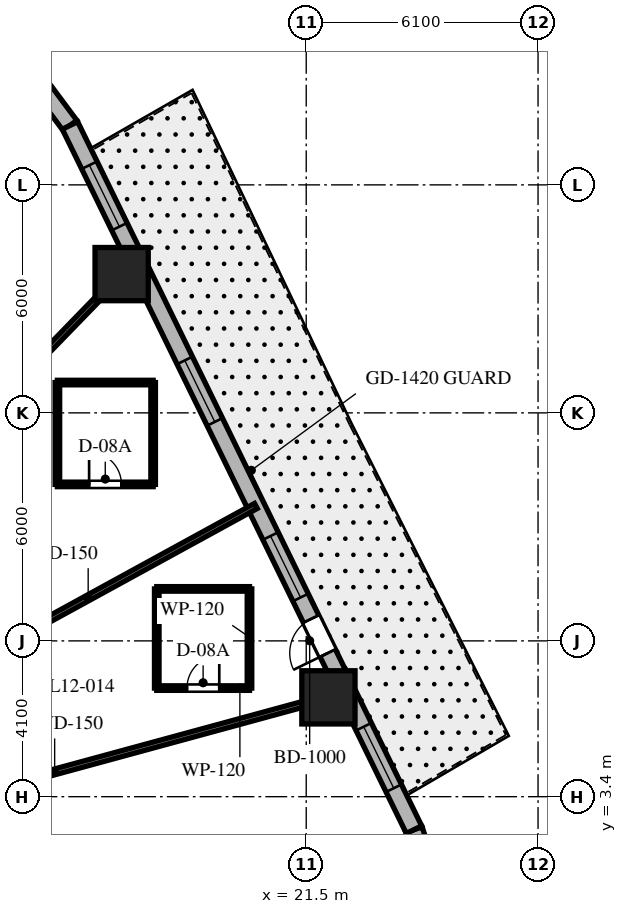
"""IFC4 building model, lengths in metres.
Left out: names, types, materials, properties, quantities, classifications, styles, units other than length and angle.
Written with IfcOpenShell. Run it as: python <this file> out.ifc"""

import sys

from ifc_helpers import new_model, si_unit, direction, frame, frame_2d, origin, origin_2d, place, context, subcontext, project, spatial, rectangle, extrude, element, fill, save


model = new_model("IFC4")
c1 = context("Model", 3, precision=1e-05, world=origin(), true_north=direction((0.0, 1.0)))
c2 = subcontext(c1, "Body", "Model", "MODEL_VIEW")
j1 = project(units=[si_unit("LENGTHUNIT", "METRE"), si_unit("PLANEANGLEUNIT", "RADIAN")], contexts=[c1])
p1 = place(None, origin())
s1 = spatial("IfcSite", under=j1, at=p1, CompositionType="ELEMENT")
p2 = place(p1, origin())
s2 = spatial("IfcBuilding", under=s1, at=p2, CompositionType="ELEMENT")
p3 = place(p2, frame((0.0, 0.0, 56.4)))
s3 = spatial("IfcBuildingStorey", under=s2, at=p3, CompositionType="ELEMENT", Elevation=56.4)
for number, where, z_axis, x_axis in (
    (1, (22.084, 6.014, 0.0), (0.0, 0.0, 1.0), (1.0, 0.0, 0.0)),
    (2, (16.643, 17.152, 0.0), (0.0, 0.0, 1.0), (1.0, 0.0, 0.0)),
):
    element("IfcColumn", number, at=place(p3, frame(where, z_axis=z_axis, x_axis=x_axis)), inside=s3, PredefinedType="COLUMN", context=c2, shape_type="SweptSolid", body=[
        extrude(rectangle(XDim=1.4, YDim=1.4, at=origin_2d()), origin(), (0.0, 0.0, 1.0), 3.7),
    ])
p4 = place(p3, frame((24.621, 1.682, 0.0), z_axis=(0.0, 0.0, 1.0), x_axis=(-0.317697451681, 0.948192137278, 0.0)))
e3 = element("IfcWall", 3, at=p4, inside=s3, PredefinedType="SOLIDWALL", context=c2, shape_type="SweptSolid", body=[
    extrude(rectangle(XDim=0.897, YDim=0.45, at=frame_2d((0.448, 0.0))), origin(), (0.0, 0.0, 1.0), 3.4),
])
p5 = place(p3, frame((15.284, 21.062, 0.0), z_axis=(0.0, 0.0, 1.0), x_axis=(-0.597595366449, 0.801797841104, 0.0)))
e4 = element("IfcWall", 4, at=p5, inside=s3, PredefinedType="SOLIDWALL", context=c2, shape_type="SweptSolid", body=[
    extrude(rectangle(XDim=1.269, YDim=0.45, at=frame_2d((0.634, 0.0))), origin(), (0.0, 0.0, 1.0), 3.4),
])
p6 = place(p3, frame((24.336, 2.532, 0.0), z_axis=(0.0, 0.0, 1.0), x_axis=(-0.438931326393, 0.898520612291, 0.0)))
e5 = element("IfcWall", 5, at=p6, inside=s3, PredefinedType="SOLIDWALL", context=c2, shape_type="SweptSolid", body=[
    extrude(rectangle(XDim=20.623, YDim=0.45, at=frame_2d((10.312, 0.0))), origin(), (0.0, 0.0, 1.0), 3.4),
])
p7 = place(p6, frame((5.171, 0.0, 0.0)))
e6 = element("IfcOpeningElement", 6, at=p7, cuts=e5, PredefinedType="OPENING", context=c2, shape_type="SweptSolid", body=[
    extrude(rectangle(XDim=1.0, YDim=2.15, at=frame_2d((0.5, 1.075))), frame((0.0, 0.235, 0.0), z_axis=(0.0, -1.0, 0.0), x_axis=(1.0, 0.0, 0.0)), (0.0, 0.0, 1.0), 0.47),
])
p8 = place(p6, frame((6.8, 0.0, 0.8)))
e7 = element("IfcOpeningElement", 7, at=p8, cuts=e5, PredefinedType="OPENING", context=c2, shape_type="SweptSolid", body=[
    extrude(rectangle(XDim=1.8, YDim=1.8, at=frame_2d((0.9, 0.9))), frame((0.0, 0.235, 0.0), z_axis=(0.0, -1.0, 0.0), x_axis=(1.0, 0.0, 0.0)), (0.0, 0.0, 1.0), 0.47),
])
p9 = place(p6, frame((11.942, 0.0, 0.8)))
e8 = element("IfcOpeningElement", 8, at=p9, cuts=e5, PredefinedType="OPENING", context=c2, shape_type="SweptSolid", body=[
    extrude(rectangle(XDim=1.8, YDim=1.8, at=frame_2d((0.9, 0.9))), frame((0.0, 0.235, 0.0), z_axis=(0.0, -1.0, 0.0), x_axis=(1.0, 0.0, 0.0)), (0.0, 0.0, 1.0), 0.47),
])
p10 = place(p6, frame((17.66, 0.0, 0.8)))
e9 = element("IfcOpeningElement", 9, at=p10, cuts=e5, PredefinedType="OPENING", context=c2, shape_type="SweptSolid", body=[
    extrude(rectangle(XDim=1.8, YDim=1.8, at=frame_2d((0.9, 0.9))), frame((0.0, 0.235, 0.0), z_axis=(0.0, -1.0, 0.0), x_axis=(1.0, 0.0, 0.0)), (0.0, 0.0, 1.0), 0.47),
])
p11 = place(p6, frame((1.214, 0.0, 0.8)))
e10 = element("IfcOpeningElement", 10, at=p11, cuts=e5, PredefinedType="OPENING", context=c2, shape_type="SweptSolid", body=[
    extrude(rectangle(XDim=1.8, YDim=1.8, at=frame_2d((0.9, 0.9))), frame((0.0, 0.235, 0.0), z_axis=(0.0, -1.0, 0.0), x_axis=(1.0, 0.0, 0.0)), (0.0, 0.0, 1.0), 0.47),
])
p12 = place(p3, frame((11.35, 3.091, 0.0), z_axis=(0.0, 0.0, 1.0), x_axis=(0.964859685283, 0.262765651704, 0.0)))
e11 = element("IfcWall", 11, at=p12, inside=s3, PredefinedType="PARTITIONING", context=c2, shape_type="SweptSolid", body=[
    extrude(rectangle(XDim=11.629, YDim=0.15, at=frame_2d((5.814, 0.0))), origin(), (0.0, 0.0, 1.0), 2.54),
])
p13 = place(p3, frame((11.35, 6.217, 0.0), z_axis=(0.0, 0.0, 1.0), x_axis=(0.877047587135, 0.480403507378, 0.0)))
e12 = element("IfcWall", 12, at=p13, inside=s3, PredefinedType="PARTITIONING", context=c2, shape_type="SweptSolid", body=[
    extrude(rectangle(XDim=10.062, YDim=0.15, at=frame_2d((5.031, 0.0))), origin(), (0.0, 0.0, 1.0), 2.54),
])
p14 = place(p3, frame((9.558, 9.85, 0.0), z_axis=(0.0, 0.0, 1.0), x_axis=(0.69638346089, 0.717669893056, 0.0)))
e13 = element("IfcWall", 13, at=p14, inside=s3, PredefinedType="PARTITIONING", context=c2, shape_type="SweptSolid", body=[
    extrude(rectangle(XDim=10.701, YDim=0.15, at=frame_2d((5.351, 0.0))), origin(), (0.0, 0.0, 1.0), 2.54),
])
p15 = place(p3, frame((17.567, 6.258, 0.0), z_axis=(0.0, 0.0, 1.0), x_axis=(1.0, 0.0, 0.0)))
e14 = element("IfcWall", 14, at=p15, inside=s3, PredefinedType="PARTITIONING", context=c2, shape_type="SweptSolid", body=[
    extrude(rectangle(XDim=2.44, YDim=0.12, at=frame_2d((1.22, 0.0))), origin(), (0.0, 0.0, 1.0), 2.84),
])
p16 = place(p15, frame((0.795, 0.0, 0.0)))
e15 = element("IfcOpeningElement", 15, at=p16, cuts=e14, PredefinedType="OPENING", context=c2, shape_type="SweptSolid", body=[
    extrude(rectangle(XDim=0.85, YDim=2.03, at=frame_2d((0.425, 1.015))), frame((0.0, 0.07, 0.0), z_axis=(0.0, -1.0, 0.0), x_axis=(1.0, 0.0, 0.0)), (0.0, 0.0, 1.0), 0.14),
])
p17 = place(p3, frame((20.007, 6.258, 0.0), z_axis=(0.0, 0.0, 1.0), x_axis=(0.0, 1.0, 0.0)))
e16 = element("IfcWall", 16, at=p17, inside=s3, PredefinedType="PARTITIONING", context=c2, shape_type="SweptSolid", body=[
    extrude(rectangle(XDim=2.61, YDim=0.12, at=frame_2d((1.305, 0.0))), origin(), (0.0, 0.0, 1.0), 2.84),
])
p18 = place(p3, frame((20.007, 8.868, 0.0), z_axis=(0.0, 0.0, 1.0), x_axis=(-1.0, 0.0, 0.0)))
e17 = element("IfcWall", 17, at=p18, inside=s3, PredefinedType="PARTITIONING", context=c2, shape_type="SweptSolid", body=[
    extrude(rectangle(XDim=2.44, YDim=0.12, at=frame_2d((1.22, 0.0))), origin(), (0.0, 0.0, 1.0), 3.4),
])
p19 = place(p3, frame((17.567, 8.868, 0.0), z_axis=(0.0, 0.0, 1.0), x_axis=(0.0, -1.0, 0.0)))
e18 = element("IfcWall", 18, at=p19, inside=s3, PredefinedType="PARTITIONING", context=c2, shape_type="SweptSolid", body=[
    extrude(rectangle(XDim=2.61, YDim=0.12, at=frame_2d((1.305, 0.0))), origin(), (0.0, 0.0, 1.0), 2.84),
])
p20 = place(p3, frame((14.952, 11.618, 0.0), z_axis=(0.0, 0.0, 1.0), x_axis=(1.0, 0.0, 0.0)))
e19 = element("IfcWall", 19, at=p20, inside=s3, PredefinedType="PARTITIONING", context=c2, shape_type="SweptSolid", body=[
    extrude(rectangle(XDim=2.52, YDim=0.12, at=frame_2d((1.26, 0.0))), origin(), (0.0, 0.0, 1.0), 2.927),
])
p21 = place(p20, frame((0.835, 0.0, 0.0)))
e20 = element("IfcOpeningElement", 20, at=p21, cuts=e19, PredefinedType="OPENING", context=c2, shape_type="SweptSolid", body=[
    extrude(rectangle(XDim=0.85, YDim=2.03, at=frame_2d((0.425, 1.015))), frame((0.0, 0.07, 0.0), z_axis=(0.0, -1.0, 0.0), x_axis=(1.0, 0.0, 0.0)), (0.0, 0.0, 1.0), 0.14),
])
p22 = place(p3, frame((17.472, 11.618, 0.0), z_axis=(0.0, 0.0, 1.0), x_axis=(0.0, 1.0, 0.0)))
e21 = element("IfcWall", 21, at=p22, inside=s3, PredefinedType="PARTITIONING", context=c2, shape_type="SweptSolid", body=[
    extrude(rectangle(XDim=2.68, YDim=0.12, at=frame_2d((1.34, 0.0))), origin(), (0.0, 0.0, 1.0), 3.4),
])
p23 = place(p3, frame((17.472, 14.298, 0.0), z_axis=(0.0, 0.0, 1.0), x_axis=(-1.0, 0.0, 0.0)))
e22 = element("IfcWall", 22, at=p23, inside=s3, PredefinedType="PARTITIONING", context=c2, shape_type="SweptSolid", body=[
    extrude(rectangle(XDim=2.52, YDim=0.12, at=frame_2d((1.26, 0.0))), origin(), (0.0, 0.0, 1.0), 3.4),
])
p24 = place(p3, frame((14.952, 14.298, 0.0), z_axis=(0.0, 0.0, 1.0), x_axis=(0.0, -1.0, 0.0)))
e23 = element("IfcWall", 23, at=p24, inside=s3, PredefinedType="PARTITIONING", context=c2, shape_type="SweptSolid", body=[
    extrude(rectangle(XDim=2.68, YDim=0.12, at=frame_2d((1.34, 0.0))), origin(), (0.0, 0.0, 1.0), 2.927),
])
p25 = place(p7, origin())
e24 = element("IfcDoor", 24, at=p25, inside=s3, OperationType="SINGLE_SWING_LEFT", PredefinedType="DOOR", context=c2, shape_type="SweptSolid", body=[
    extrude(rectangle(XDim=1.0, YDim=2.15, at=frame_2d((0.5, 1.075))), frame((0.0, 0.025, 0.0), z_axis=(0.0, -1.0, 0.0), x_axis=(1.0, 0.0, 0.0)), (0.0, 0.0, 1.0), 0.05),
])
fill(e6, e24)
p26 = place(p8, origin())
e25 = element("IfcWindow", 25, at=p26, inside=s3, PartitioningType="SINGLE_PANEL", PredefinedType="WINDOW", context=c2, shape_type="SweptSolid", body=[
    extrude(rectangle(XDim=1.8, YDim=1.8, at=frame_2d((0.9, 0.9))), frame((0.0, 0.03, 0.0), z_axis=(0.0, -1.0, 0.0), x_axis=(1.0, 0.0, 0.0)), (0.0, 0.0, 1.0), 0.06),
])
fill(e7, e25)
p27 = place(p9, origin())
e26 = element("IfcWindow", 26, at=p27, inside=s3, PartitioningType="SINGLE_PANEL", PredefinedType="WINDOW", context=c2, shape_type="SweptSolid", body=[
    extrude(rectangle(XDim=1.8, YDim=1.8, at=frame_2d((0.9, 0.9))), frame((0.0, 0.03, 0.0), z_axis=(0.0, -1.0, 0.0), x_axis=(1.0, 0.0, 0.0)), (0.0, 0.0, 1.0), 0.06),
])
fill(e8, e26)
p28 = place(p10, origin())
e27 = element("IfcWindow", 27, at=p28, inside=s3, PartitioningType="SINGLE_PANEL", PredefinedType="WINDOW", context=c2, shape_type="SweptSolid", body=[
    extrude(rectangle(XDim=1.8, YDim=1.8, at=frame_2d((0.9, 0.9))), frame((0.0, 0.03, 0.0), z_axis=(0.0, -1.0, 0.0), x_axis=(1.0, 0.0, 0.0)), (0.0, 0.0, 1.0), 0.06),
])
fill(e9, e27)
p29 = place(p11, origin())
e28 = element("IfcWindow", 28, at=p29, inside=s3, PartitioningType="SINGLE_PANEL", PredefinedType="WINDOW", context=c2, shape_type="SweptSolid", body=[
    extrude(rectangle(XDim=1.8, YDim=1.8, at=frame_2d((0.9, 0.9))), frame((0.0, 0.03, 0.0), z_axis=(0.0, -1.0, 0.0), x_axis=(1.0, 0.0, 0.0)), (0.0, 0.0, 1.0), 0.06),
])
fill(e10, e28)
p30 = place(p16, origin())
e29 = element("IfcDoor", 29, at=p30, inside=s3, OperationType="SINGLE_SWING_RIGHT", PredefinedType="DOOR", context=c2, shape_type="SweptSolid", body=[
    extrude(rectangle(XDim=0.85, YDim=2.03, at=frame_2d((0.425, 1.015))), frame((0.0, 0.025, 0.0), z_axis=(0.0, -1.0, 0.0), x_axis=(1.0, 0.0, 0.0)), (0.0, 0.0, 1.0), 0.05),
])
fill(e15, e29)
p31 = place(p21, origin())
e30 = element("IfcDoor", 30, at=p31, inside=s3, OperationType="SINGLE_SWING_LEFT", PredefinedType="DOOR", context=c2, shape_type="SweptSolid", body=[
    extrude(rectangle(XDim=0.85, YDim=2.03, at=frame_2d((0.425, 1.015))), frame((0.0, 0.025, 0.0), z_axis=(0.0, -1.0, 0.0), x_axis=(1.0, 0.0, 0.0)), (0.0, 0.0, 1.0), 0.05),
])
fill(e20, e30)
save(model, sys.argv[1])
